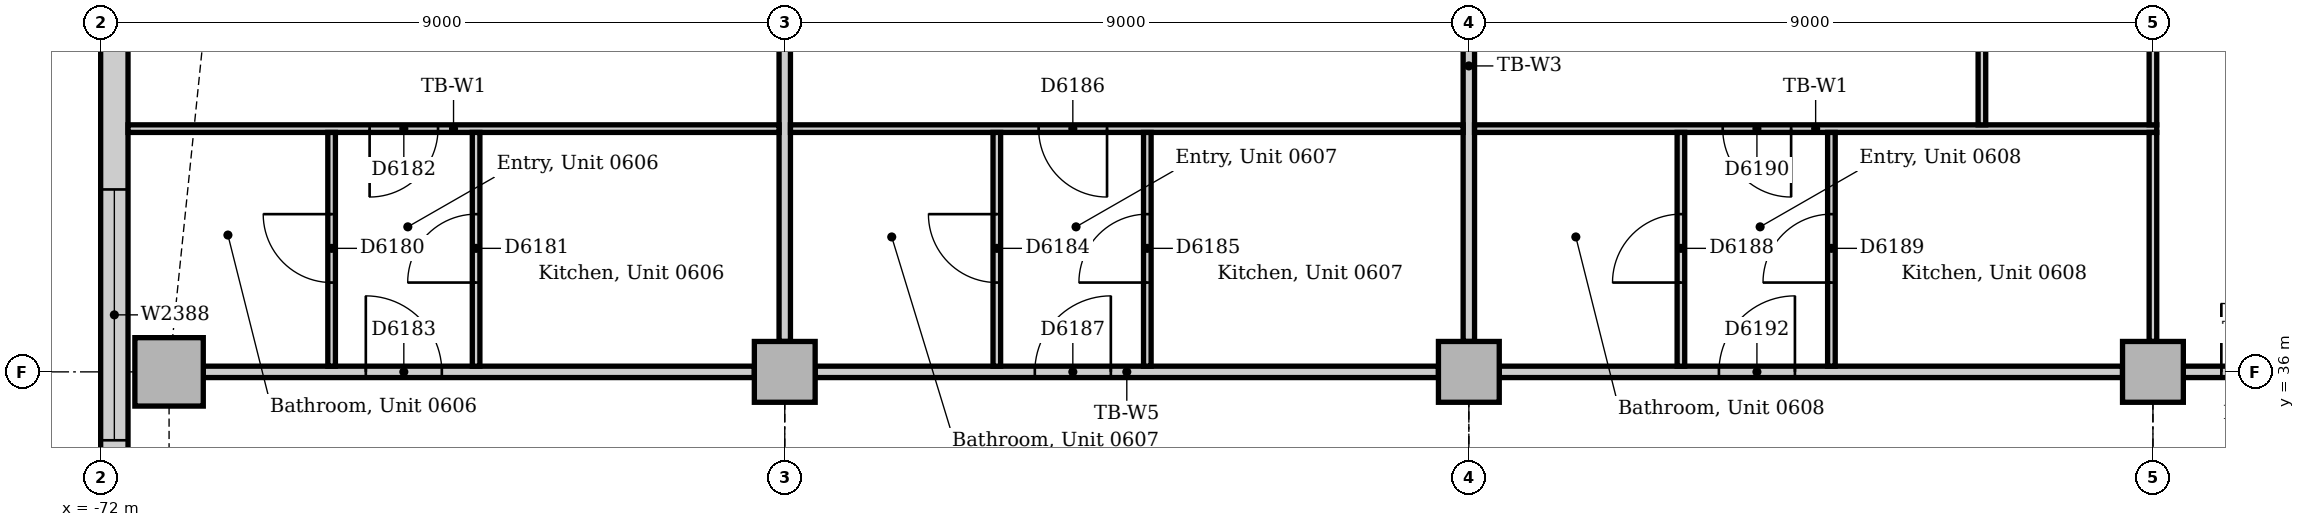
"""IFC4 building model, lengths in metres.
Left out: names, types, materials, properties, quantities, classifications, styles, units other than length and angle.
Written with IfcOpenShell. Run it as: python <this file> out.ifc"""

import sys

from ifc_helpers import new_model, si_unit, direction, frame, frame_2d, origin, origin_2d, place, context, subcontext, project, spatial, rectangle, extrude, element, fill, save


model = new_model("IFC4")
c1 = context("Model", 3, precision=1e-05, world=origin(), true_north=direction((0.0, 1.0)))
c2 = subcontext(c1, "Body", "Model", "MODEL_VIEW")
j1 = project(units=[si_unit("LENGTHUNIT", "METRE"), si_unit("PLANEANGLEUNIT", "RADIAN")], contexts=[c1])
p1 = place(None, origin())
s1 = spatial("IfcSite", under=j1, at=p1, CompositionType="ELEMENT")
p2 = place(p1, origin())
s2 = spatial("IfcBuilding", under=s1, at=p2, CompositionType="ELEMENT")
p3 = place(p2, frame((0.0, 0.0, 30.0)))
s3 = spatial("IfcBuildingStorey", under=s2, at=p3, CompositionType="ELEMENT", Elevation=30.0)
p4 = place(p3, frame((-71.1, 36.0, 0.0), z_axis=(0.0, 0.0, 1.0), x_axis=(1.0, 0.0, 0.0)))
e1 = element("IfcColumn", 1, at=p4, inside=s3, PredefinedType="COLUMN", context=c2, shape_type="SweptSolid", body=[
    extrude(rectangle(XDim=0.9, YDim=0.9, at=origin_2d()), origin(), (0.0, 0.0, 1.0), 3.85),
])
for number, where, z_axis, x_axis in (
    (2, (-63.0, 36.0, 0.0), (0.0, 0.0, 1.0), (1.0, 0.0, 0.0)),
    (3, (-54.0, 36.0, 0.0), (0.0, 0.0, 1.0), (1.0, 0.0, 0.0)),
    (4, (-45.0, 36.0, 0.0), (0.0, 0.0, 1.0), (1.0, 0.0, 0.0)),
):
    element("IfcColumn", number, at=place(p3, frame(where, z_axis=z_axis, x_axis=x_axis)), inside=s3, PredefinedType="COLUMN", context=c2, shape_type="SweptSolid", body=[
        extrude(rectangle(XDim=0.8, YDim=0.8, at=origin_2d()), origin(), (0.0, 0.0, 1.0), 3.85),
    ])
p5 = place(p3, frame((-71.82, 40.757, 0.0), z_axis=(0.0, 0.0, 1.0), x_axis=(0.0, -1.0, 0.0)))
e5 = element("IfcWall", 5, at=p5, inside=s3, PredefinedType="STANDARD", context=c2, shape_type="SweptSolid", body=[
    extrude(rectangle(XDim=26.015, YDim=0.36, at=frame_2d((13.007, 0.0))), origin(), (0.0, 0.0, 1.0), 3.85),
])
p6 = place(p5, frame((2.357, 0.0, 0.9)))
e6 = element("IfcOpeningElement", 6, at=p6, cuts=e5, PredefinedType="OPENING", context=c2, shape_type="SweptSolid", body=[
    extrude(rectangle(XDim=3.3, YDim=1.6, at=frame_2d((1.65, 0.8))), frame((0.0, 0.19, 0.0), z_axis=(0.0, -1.0, 0.0), x_axis=(1.0, 0.0, 0.0)), (0.0, 0.0, 1.0), 0.38),
])
p7 = place(p5, frame((7.057, 0.0, 0.9)))
e7 = element("IfcOpeningElement", 7, at=p7, cuts=e5, PredefinedType="OPENING", context=c2, shape_type="SweptSolid", body=[
    extrude(rectangle(XDim=3.3, YDim=1.6, at=frame_2d((1.65, 0.8))), frame((0.0, 0.19, 0.0), z_axis=(0.0, -1.0, 0.0), x_axis=(1.0, 0.0, 0.0)), (0.0, 0.0, 1.0), 0.38),
])
p8 = place(p5, frame((11.357, 0.0, 0.9)))
e8 = element("IfcOpeningElement", 8, at=p8, cuts=e5, PredefinedType="OPENING", context=c2, shape_type="SweptSolid", body=[
    extrude(rectangle(XDim=3.3, YDim=1.6, at=frame_2d((1.65, 0.8))), frame((0.0, 0.19, 0.0), z_axis=(0.0, -1.0, 0.0), x_axis=(1.0, 0.0, 0.0)), (0.0, 0.0, 1.0), 0.38),
])
p9 = place(p5, frame((15.857, 0.0, 0.9)))
e9 = element("IfcOpeningElement", 9, at=p9, cuts=e5, PredefinedType="OPENING", context=c2, shape_type="SweptSolid", body=[
    extrude(rectangle(XDim=3.3, YDim=1.6, at=frame_2d((1.65, 0.8))), frame((0.0, 0.19, 0.0), z_axis=(0.0, -1.0, 0.0), x_axis=(1.0, 0.0, 0.0)), (0.0, 0.0, 1.0), 0.38),
])
p10 = place(p5, frame((20.957, 0.0, 0.9)))
e10 = element("IfcOpeningElement", 10, at=p10, cuts=e5, PredefinedType="OPENING", context=c2, shape_type="SweptSolid", body=[
    extrude(rectangle(XDim=3.3, YDim=1.6, at=frame_2d((1.65, 0.8))), frame((0.0, 0.19, 0.0), z_axis=(0.0, -1.0, 0.0), x_axis=(1.0, 0.0, 0.0)), (0.0, 0.0, 1.0), 0.38),
])
p11 = place(p3, frame((-44.6, 36.0, 0.0), z_axis=(0.0, 0.0, 1.0), x_axis=(1.0, 0.0, 0.0)))
e11 = element("IfcWall", 11, at=p11, inside=s3, PredefinedType="PARTITIONING", context=c2, shape_type="SweptSolid", body=[
    extrude(rectangle(XDim=1.875, YDim=0.15, at=frame_2d((0.938, 0.0))), origin(), (0.0, 0.0, 1.0), 3.602),
])
p12 = place(p11, frame((0.5, 0.0, 0.0)))
e12 = element("IfcOpeningElement", 12, at=p12, cuts=e11, PredefinedType="OPENING", context=c2, shape_type="SweptSolid", body=[
    extrude(rectangle(XDim=0.9, YDim=2.1, at=frame_2d((0.45, 1.05))), frame((0.0, 0.085, 0.0), z_axis=(0.0, -1.0, 0.0), x_axis=(1.0, 0.0, 0.0)), (0.0, 0.0, 1.0), 0.17),
])
p13 = place(p3, frame((-53.6, 36.0, 0.0), z_axis=(0.0, 0.0, 1.0), x_axis=(1.0, 0.0, 0.0)))
e13 = element("IfcWall", 13, at=p13, inside=s3, PredefinedType="PARTITIONING", context=c2, shape_type="SweptSolid", body=[
    extrude(rectangle(XDim=8.2, YDim=0.15, at=frame_2d((4.1, 0.0))), origin(), (0.0, 0.0, 1.0), 3.15),
])
p14 = place(p13, frame((2.89, 0.0, 0.0)))
e14 = element("IfcOpeningElement", 14, at=p14, cuts=e13, PredefinedType="OPENING", context=c2, shape_type="SweptSolid", body=[
    extrude(rectangle(XDim=1.0, YDim=2.1, at=frame_2d((0.5, 1.05))), frame((0.0, 0.085, 0.0), z_axis=(0.0, -1.0, 0.0), x_axis=(1.0, 0.0, 0.0)), (0.0, 0.0, 1.0), 0.17),
])
p15 = place(p3, frame((-62.6, 36.0, 0.0), z_axis=(0.0, 0.0, 1.0), x_axis=(1.0, 0.0, 0.0)))
e15 = element("IfcWall", 15, at=p15, inside=s3, PredefinedType="PARTITIONING", context=c2, shape_type="SweptSolid", body=[
    extrude(rectangle(XDim=8.2, YDim=0.15, at=frame_2d((4.1, 0.0))), origin(), (0.0, 0.0, 1.0), 3.15),
])
p16 = place(p15, frame((2.89, 0.0, 0.0)))
e16 = element("IfcOpeningElement", 16, at=p16, cuts=e15, PredefinedType="OPENING", context=c2, shape_type="SweptSolid", body=[
    extrude(rectangle(XDim=1.0, YDim=2.1, at=frame_2d((0.5, 1.05))), frame((0.0, 0.085, 0.0), z_axis=(0.0, -1.0, 0.0), x_axis=(1.0, 0.0, 0.0)), (0.0, 0.0, 1.0), 0.17),
])
p17 = place(p3, frame((-70.65, 36.0, 0.0), z_axis=(0.0, 0.0, 1.0), x_axis=(1.0, 0.0, 0.0)))
e17 = element("IfcWall", 17, at=p17, inside=s3, PredefinedType="PARTITIONING", context=c2, shape_type="SweptSolid", body=[
    extrude(rectangle(XDim=7.25, YDim=0.15, at=frame_2d((3.625, 0.0))), origin(), (0.0, 0.0, 1.0), 3.15),
])
p18 = place(p17, frame((2.138, 0.0, 0.0)))
e18 = element("IfcOpeningElement", 18, at=p18, cuts=e17, PredefinedType="OPENING", context=c2, shape_type="SweptSolid", body=[
    extrude(rectangle(XDim=1.0, YDim=2.1, at=frame_2d((0.5, 1.05))), frame((0.0, 0.085, 0.0), z_axis=(0.0, -1.0, 0.0), x_axis=(1.0, 0.0, 0.0)), (0.0, 0.0, 1.0), 0.17),
])
for number, where, z_axis, x_axis in (
    (19, (-63.0, 36.4, 0.0), (0.0, 0.0, 1.0), (0.0, 1.0, 0.0)),
    (20, (-54.0, 36.4, 0.0), (0.0, 0.0, 1.0), (0.0, 1.0, 0.0)),
):
    element("IfcWall", number, at=place(p3, frame(where, z_axis=z_axis, x_axis=x_axis)), inside=s3, PredefinedType="PARTITIONING", context=c2, shape_type="SweptSolid", body=[
        extrude(rectangle(XDim=7.25, YDim=0.15, at=frame_2d((3.625, 0.0))), origin(), (0.0, 0.0, 1.0), 3.158),
    ])
p19 = place(p3, frame((-53.925, 39.2, 0.0), z_axis=(0.0, 0.0, 1.0), x_axis=(1.0, 0.0, 0.0)))
e21 = element("IfcWall", 21, at=p19, inside=s3, PredefinedType="PARTITIONING", context=c2, shape_type="SweptSolid", body=[
    extrude(rectangle(XDim=8.975, YDim=0.1, at=frame_2d((4.487, 0.0))), origin(), (0.0, 0.0, 1.0), 3.85),
])
p20 = place(p19, frame((3.265, 0.0, 0.0)))
e22 = element("IfcOpeningElement", 22, at=p20, cuts=e21, PredefinedType="OPENING", context=c2, shape_type="SweptSolid", body=[
    extrude(rectangle(XDim=0.9, YDim=2.1, at=frame_2d((0.45, 1.05))), frame((0.0, 0.06, 0.0), z_axis=(0.0, -1.0, 0.0), x_axis=(1.0, 0.0, 0.0)), (0.0, 0.0, 1.0), 0.12),
])
p21 = place(p3, frame((-62.925, 39.2, 0.0), z_axis=(0.0, 0.0, 1.0), x_axis=(1.0, 0.0, 0.0)))
e23 = element("IfcWall", 23, at=p21, inside=s3, PredefinedType="PARTITIONING", context=c2, shape_type="SweptSolid", body=[
    extrude(rectangle(XDim=8.85, YDim=0.1, at=frame_2d((4.425, 0.0))), origin(), (0.0, 0.0, 1.0), 3.85),
])
p22 = place(p21, frame((3.265, 0.0, 0.0)))
e24 = element("IfcOpeningElement", 24, at=p22, cuts=e23, PredefinedType="OPENING", context=c2, shape_type="SweptSolid", body=[
    extrude(rectangle(XDim=0.9, YDim=2.1, at=frame_2d((0.45, 1.05))), frame((0.0, 0.06, 0.0), z_axis=(0.0, -1.0, 0.0), x_axis=(1.0, 0.0, 0.0)), (0.0, 0.0, 1.0), 0.12),
])
p23 = place(p3, frame((-71.64, 39.2, 0.0), z_axis=(0.0, 0.0, 1.0), x_axis=(1.0, 0.0, 0.0)))
e25 = element("IfcWall", 25, at=p23, inside=s3, PredefinedType="PARTITIONING", context=c2, shape_type="SweptSolid", body=[
    extrude(rectangle(XDim=8.565, YDim=0.1, at=frame_2d((4.282, 0.0))), origin(), (0.0, 0.0, 1.0), 3.85),
])
p24 = place(p23, frame((3.178, 0.0, 0.0)))
e26 = element("IfcOpeningElement", 26, at=p24, cuts=e25, PredefinedType="OPENING", context=c2, shape_type="SweptSolid", body=[
    extrude(rectangle(XDim=0.9, YDim=2.1, at=frame_2d((0.45, 1.05))), frame((0.0, 0.06, 0.0), z_axis=(0.0, -1.0, 0.0), x_axis=(1.0, 0.0, 0.0)), (0.0, 0.0, 1.0), 0.12),
])
p25 = place(p3, frame((-45.0, 39.25, 0.0), z_axis=(0.0, 0.0, 1.0), x_axis=(0.0, 1.0, 0.0)))
e27 = element("IfcWall", 27, at=p25, inside=s3, PredefinedType="PARTITIONING", context=c2, shape_type="SweptSolid", body=[
    extrude(rectangle(XDim=4.4, YDim=0.1, at=frame_2d((2.2, 0.0))), origin(), (0.0, 0.0, 1.0), 3.158),
])
p26 = place(p3, frame((-45.0, 36.4, 0.0), z_axis=(0.0, 0.0, 1.0), x_axis=(0.0, 1.0, 0.0)))
e28 = element("IfcWall", 28, at=p26, inside=s3, PredefinedType="PARTITIONING", context=c2, shape_type="SweptSolid", body=[
    extrude(rectangle(XDim=2.75, YDim=0.1, at=frame_2d((1.375, 0.0))), origin(), (0.0, 0.0, 1.0), 3.158),
])
p27 = place(p3, frame((-47.25, 39.25, 0.0), z_axis=(0.0, 0.0, 1.0), x_axis=(0.0, 1.0, 0.0)))
e29 = element("IfcWall", 29, at=p27, inside=s3, PredefinedType="PARTITIONING", context=c2, shape_type="SweptSolid", body=[
    extrude(rectangle(XDim=5.39, YDim=0.1, at=frame_2d((2.695, 0.0))), origin(), (0.0, 0.0, 1.0), 3.85),
])
p28 = place(p27, frame((2.25, 0.0, 0.0)))
e30 = element("IfcOpeningElement", 30, at=p28, cuts=e29, PredefinedType="OPENING", context=c2, shape_type="SweptSolid", body=[
    extrude(rectangle(XDim=0.9, YDim=2.1, at=frame_2d((0.45, 1.05))), frame((0.0, 0.06, 0.0), z_axis=(0.0, -1.0, 0.0), x_axis=(1.0, 0.0, 0.0)), (0.0, 0.0, 1.0), 0.12),
])
p29 = place(p3, frame((-68.962, 36.075, 0.0), z_axis=(0.0, 0.0, 1.0), x_axis=(0.0, 1.0, 0.0)))
e31 = element("IfcWall", 31, at=p29, inside=s3, PredefinedType="PARTITIONING", context=c2, shape_type="SweptSolid", body=[
    extrude(rectangle(XDim=3.075, YDim=0.1, at=frame_2d((1.538, 0.0))), origin(), (0.0, 0.0, 1.0), 3.85),
])
p30 = place(p29, frame((1.1, 0.0, 0.0)))
e32 = element("IfcOpeningElement", 32, at=p30, cuts=e31, PredefinedType="OPENING", context=c2, shape_type="SweptSolid", body=[
    extrude(rectangle(XDim=0.9, YDim=2.1, at=frame_2d((0.45, 1.05))), frame((0.0, 0.06, 0.0), z_axis=(0.0, -1.0, 0.0), x_axis=(1.0, 0.0, 0.0)), (0.0, 0.0, 1.0), 0.12),
])
p31 = place(p3, frame((-67.061, 36.075, 0.0), z_axis=(0.0, 0.0, 1.0), x_axis=(0.0, 1.0, 0.0)))
e33 = element("IfcWall", 33, at=p31, inside=s3, PredefinedType="PARTITIONING", context=c2, shape_type="SweptSolid", body=[
    extrude(rectangle(XDim=3.075, YDim=0.1, at=frame_2d((1.538, 0.0))), origin(), (0.0, 0.0, 1.0), 3.85),
])
p32 = place(p31, frame((1.1, 0.0, 0.0)))
e34 = element("IfcOpeningElement", 34, at=p32, cuts=e33, PredefinedType="OPENING", context=c2, shape_type="SweptSolid", body=[
    extrude(rectangle(XDim=0.9, YDim=2.1, at=frame_2d((0.45, 1.05))), frame((0.0, 0.06, 0.0), z_axis=(0.0, -1.0, 0.0), x_axis=(1.0, 0.0, 0.0)), (0.0, 0.0, 1.0), 0.12),
])
p33 = place(p3, frame((-60.21, 36.075, 0.0), z_axis=(0.0, 0.0, 1.0), x_axis=(0.0, 1.0, 0.0)))
e35 = element("IfcWall", 35, at=p33, inside=s3, PredefinedType="PARTITIONING", context=c2, shape_type="SweptSolid", body=[
    extrude(rectangle(XDim=3.075, YDim=0.1, at=frame_2d((1.538, 0.0))), origin(), (0.0, 0.0, 1.0), 3.85),
])
p34 = place(p33, frame((1.1, 0.0, 0.0)))
e36 = element("IfcOpeningElement", 36, at=p34, cuts=e35, PredefinedType="OPENING", context=c2, shape_type="SweptSolid", body=[
    extrude(rectangle(XDim=0.9, YDim=2.1, at=frame_2d((0.45, 1.05))), frame((0.0, 0.06, 0.0), z_axis=(0.0, -1.0, 0.0), x_axis=(1.0, 0.0, 0.0)), (0.0, 0.0, 1.0), 0.12),
])
p35 = place(p3, frame((-58.23, 36.075, 0.0), z_axis=(0.0, 0.0, 1.0), x_axis=(0.0, 1.0, 0.0)))
e37 = element("IfcWall", 37, at=p35, inside=s3, PredefinedType="PARTITIONING", context=c2, shape_type="SweptSolid", body=[
    extrude(rectangle(XDim=3.075, YDim=0.1, at=frame_2d((1.538, 0.0))), origin(), (0.0, 0.0, 1.0), 3.85),
])
p36 = place(p35, frame((1.1, 0.0, 0.0)))
e38 = element("IfcOpeningElement", 38, at=p36, cuts=e37, PredefinedType="OPENING", context=c2, shape_type="SweptSolid", body=[
    extrude(rectangle(XDim=0.9, YDim=2.1, at=frame_2d((0.45, 1.05))), frame((0.0, 0.06, 0.0), z_axis=(0.0, -1.0, 0.0), x_axis=(1.0, 0.0, 0.0)), (0.0, 0.0, 1.0), 0.12),
])
p37 = place(p3, frame((-51.21, 36.075, 0.0), z_axis=(0.0, 0.0, 1.0), x_axis=(0.0, 1.0, 0.0)))
e39 = element("IfcWall", 39, at=p37, inside=s3, PredefinedType="PARTITIONING", context=c2, shape_type="SweptSolid", body=[
    extrude(rectangle(XDim=3.075, YDim=0.1, at=frame_2d((1.538, 0.0))), origin(), (0.0, 0.0, 1.0), 3.85),
])
p38 = place(p37, frame((1.1, 0.0, 0.0)))
e40 = element("IfcOpeningElement", 40, at=p38, cuts=e39, PredefinedType="OPENING", context=c2, shape_type="SweptSolid", body=[
    extrude(rectangle(XDim=0.9, YDim=2.1, at=frame_2d((0.45, 1.05))), frame((0.0, 0.06, 0.0), z_axis=(0.0, -1.0, 0.0), x_axis=(1.0, 0.0, 0.0)), (0.0, 0.0, 1.0), 0.12),
])
p39 = place(p3, frame((-49.23, 36.075, 0.0), z_axis=(0.0, 0.0, 1.0), x_axis=(0.0, 1.0, 0.0)))
e41 = element("IfcWall", 41, at=p39, inside=s3, PredefinedType="PARTITIONING", context=c2, shape_type="SweptSolid", body=[
    extrude(rectangle(XDim=3.075, YDim=0.1, at=frame_2d((1.538, 0.0))), origin(), (0.0, 0.0, 1.0), 3.85),
])
p40 = place(p39, frame((1.1, 0.0, 0.0)))
e42 = element("IfcOpeningElement", 42, at=p40, cuts=e41, PredefinedType="OPENING", context=c2, shape_type="SweptSolid", body=[
    extrude(rectangle(XDim=0.9, YDim=2.1, at=frame_2d((0.45, 1.05))), frame((0.0, 0.06, 0.0), z_axis=(0.0, -1.0, 0.0), x_axis=(1.0, 0.0, 0.0)), (0.0, 0.0, 1.0), 0.12),
])
p41 = place(p6, origin())
e43 = element("IfcWindow", 43, at=p41, inside=s3, PartitioningType="SINGLE_PANEL", PredefinedType="WINDOW", context=c2, shape_type="SweptSolid", body=[
    extrude(rectangle(XDim=3.3, YDim=1.6, at=frame_2d((1.65, 0.8))), frame((0.0, 0.13, 0.0), z_axis=(0.0, -1.0, 0.0), x_axis=(1.0, 0.0, 0.0)), (0.0, 0.0, 1.0), 0.06),
])
fill(e6, e43)
p42 = place(p12, origin())
e44 = element("IfcDoor", 44, at=p42, inside=s3, OperationType="SINGLE_SWING_LEFT", PredefinedType="DOOR", context=c2, shape_type="SweptSolid", body=[
    extrude(rectangle(XDim=0.9, YDim=2.1, at=frame_2d((0.45, 1.05))), frame((0.0, 0.025, 0.0), z_axis=(0.0, -1.0, 0.0), x_axis=(1.0, 0.0, 0.0)), (0.0, 0.0, 1.0), 0.05),
])
fill(e12, e44)
p43 = place(p30, origin())
e45 = element("IfcDoor", 45, at=p43, inside=s3, OperationType="SINGLE_SWING_RIGHT", PredefinedType="DOOR", context=c2, shape_type="SweptSolid", body=[
    extrude(rectangle(XDim=0.9, YDim=2.1, at=frame_2d((0.45, 1.05))), frame((0.0, 0.025, 0.0), z_axis=(0.0, -1.0, 0.0), x_axis=(1.0, 0.0, 0.0)), (0.0, 0.0, 1.0), 0.05),
])
fill(e32, e45)
p44 = place(p32, origin())
e46 = element("IfcDoor", 46, at=p44, inside=s3, OperationType="SINGLE_SWING_LEFT", PredefinedType="DOOR", context=c2, shape_type="SweptSolid", body=[
    extrude(rectangle(XDim=0.9, YDim=2.1, at=frame_2d((0.45, 1.05))), frame((0.0, 0.025, 0.0), z_axis=(0.0, -1.0, 0.0), x_axis=(1.0, 0.0, 0.0)), (0.0, 0.0, 1.0), 0.05),
])
fill(e34, e46)
p45 = place(p24, frame((0.9, 0.0, 0.0), z_axis=(0.0, 0.0, 1.0), x_axis=(-1.0, 0.0, 0.0)))
e47 = element("IfcDoor", 47, at=p45, inside=s3, OperationType="SINGLE_SWING_RIGHT", PredefinedType="DOOR", context=c2, shape_type="SweptSolid", body=[
    extrude(rectangle(XDim=0.9, YDim=2.1, at=frame_2d((0.45, 1.05))), frame((0.0, 0.025, 0.0), z_axis=(0.0, -1.0, 0.0), x_axis=(1.0, 0.0, 0.0)), (0.0, 0.0, 1.0), 0.05),
])
fill(e26, e47)
p46 = place(p18, origin())
e48 = element("IfcDoor", 48, at=p46, inside=s3, OperationType="SINGLE_SWING_LEFT", PredefinedType="DOOR", context=c2, shape_type="SweptSolid", body=[
    extrude(rectangle(XDim=1.0, YDim=2.1, at=frame_2d((0.5, 1.05))), frame((0.0, 0.025, 0.0), z_axis=(0.0, -1.0, 0.0), x_axis=(1.0, 0.0, 0.0)), (0.0, 0.0, 1.0), 0.05),
])
fill(e18, e48)
p47 = place(p34, origin())
e49 = element("IfcDoor", 49, at=p47, inside=s3, OperationType="SINGLE_SWING_RIGHT", PredefinedType="DOOR", context=c2, shape_type="SweptSolid", body=[
    extrude(rectangle(XDim=0.9, YDim=2.1, at=frame_2d((0.45, 1.05))), frame((0.0, 0.025, 0.0), z_axis=(0.0, -1.0, 0.0), x_axis=(1.0, 0.0, 0.0)), (0.0, 0.0, 1.0), 0.05),
])
fill(e36, e49)
p48 = place(p36, origin())
e50 = element("IfcDoor", 50, at=p48, inside=s3, OperationType="SINGLE_SWING_LEFT", PredefinedType="DOOR", context=c2, shape_type="SweptSolid", body=[
    extrude(rectangle(XDim=0.9, YDim=2.1, at=frame_2d((0.45, 1.05))), frame((0.0, 0.025, 0.0), z_axis=(0.0, -1.0, 0.0), x_axis=(1.0, 0.0, 0.0)), (0.0, 0.0, 1.0), 0.05),
])
fill(e38, e50)
p49 = place(p22, frame((0.9, 0.0, 0.0), z_axis=(0.0, 0.0, 1.0), x_axis=(-1.0, 0.0, 0.0)))
e51 = element("IfcDoor", 51, at=p49, inside=s3, OperationType="SINGLE_SWING_LEFT", PredefinedType="DOOR", context=c2, shape_type="SweptSolid", body=[
    extrude(rectangle(XDim=0.9, YDim=2.1, at=frame_2d((0.45, 1.05))), frame((0.0, 0.025, 0.0), z_axis=(0.0, -1.0, 0.0), x_axis=(1.0, 0.0, 0.0)), (0.0, 0.0, 1.0), 0.05),
])
fill(e24, e51)
p50 = place(p16, origin())
e52 = element("IfcDoor", 52, at=p50, inside=s3, OperationType="SINGLE_SWING_RIGHT", PredefinedType="DOOR", context=c2, shape_type="SweptSolid", body=[
    extrude(rectangle(XDim=1.0, YDim=2.1, at=frame_2d((0.5, 1.05))), frame((0.0, 0.025, 0.0), z_axis=(0.0, -1.0, 0.0), x_axis=(1.0, 0.0, 0.0)), (0.0, 0.0, 1.0), 0.05),
])
fill(e16, e52)
p51 = place(p38, origin())
e53 = element("IfcDoor", 53, at=p51, inside=s3, OperationType="SINGLE_SWING_LEFT", PredefinedType="DOOR", context=c2, shape_type="SweptSolid", body=[
    extrude(rectangle(XDim=0.9, YDim=2.1, at=frame_2d((0.45, 1.05))), frame((0.0, 0.025, 0.0), z_axis=(0.0, -1.0, 0.0), x_axis=(1.0, 0.0, 0.0)), (0.0, 0.0, 1.0), 0.05),
])
fill(e40, e53)
p52 = place(p40, origin())
e54 = element("IfcDoor", 54, at=p52, inside=s3, OperationType="SINGLE_SWING_LEFT", PredefinedType="DOOR", context=c2, shape_type="SweptSolid", body=[
    extrude(rectangle(XDim=0.9, YDim=2.1, at=frame_2d((0.45, 1.05))), frame((0.0, 0.025, 0.0), z_axis=(0.0, -1.0, 0.0), x_axis=(1.0, 0.0, 0.0)), (0.0, 0.0, 1.0), 0.05),
])
fill(e42, e54)
p53 = place(p20, frame((0.9, 0.0, 0.0), z_axis=(0.0, 0.0, 1.0), x_axis=(-1.0, 0.0, 0.0)))
e55 = element("IfcDoor", 55, at=p53, inside=s3, OperationType="SINGLE_SWING_LEFT", PredefinedType="DOOR", context=c2, shape_type="SweptSolid", body=[
    extrude(rectangle(XDim=0.9, YDim=2.1, at=frame_2d((0.45, 1.05))), frame((0.0, 0.025, 0.0), z_axis=(0.0, -1.0, 0.0), x_axis=(1.0, 0.0, 0.0)), (0.0, 0.0, 1.0), 0.05),
])
fill(e22, e55)
p54 = place(p14, origin())
e56 = element("IfcDoor", 56, at=p54, inside=s3, OperationType="SINGLE_SWING_RIGHT", PredefinedType="DOOR", context=c2, shape_type="SweptSolid", body=[
    extrude(rectangle(XDim=1.0, YDim=2.1, at=frame_2d((0.5, 1.05))), frame((0.0, 0.025, 0.0), z_axis=(0.0, -1.0, 0.0), x_axis=(1.0, 0.0, 0.0)), (0.0, 0.0, 1.0), 0.05),
])
fill(e14, e56)
save(model, sys.argv[1])
